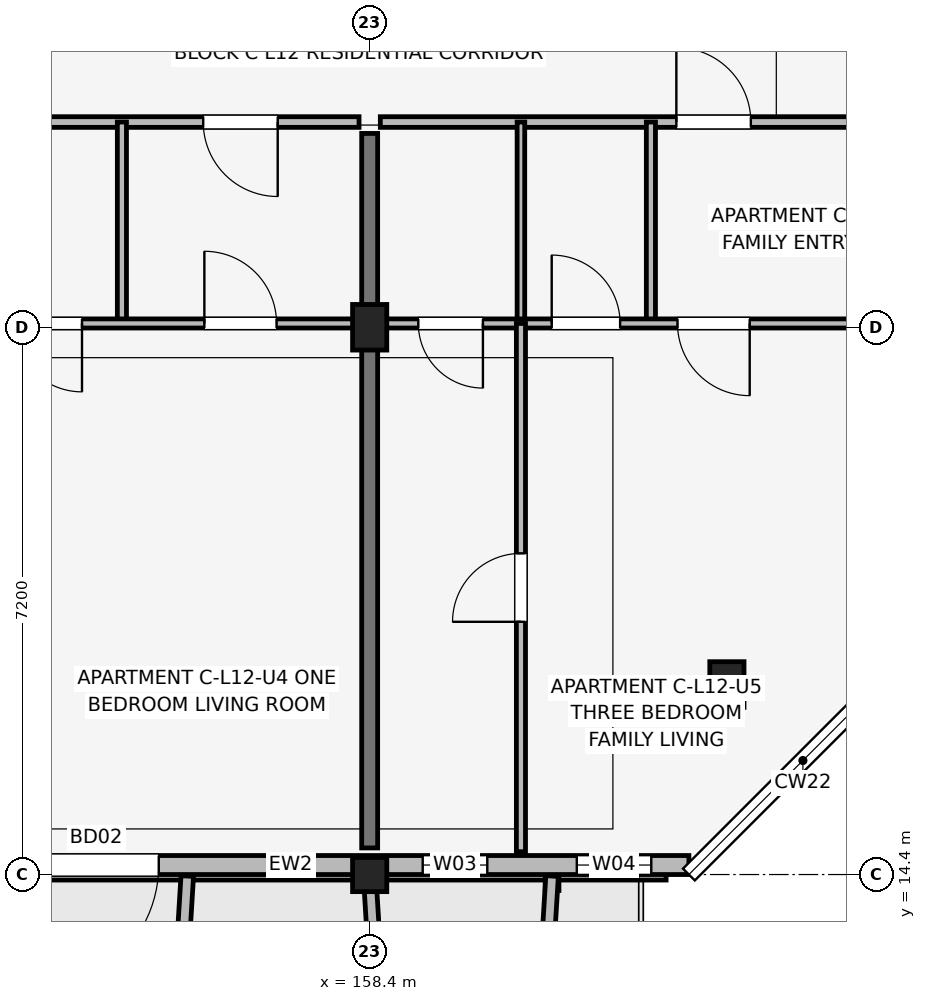
"""IFC4 building model, lengths in metres.
Left out: names, types, materials, properties, quantities, classifications, styles, units other than length and angle.
Written with IfcOpenShell. Run it as: python <this file> out.ifc"""

import sys

from ifc_helpers import new_model, si_unit, direction, frame, frame_2d, origin, origin_2d, place, context, subcontext, project, spatial, rectangle, extrude, element, fill, save


model = new_model("IFC4")
c1 = context("Model", 3, precision=1e-05, world=origin(), true_north=direction((0.0, 1.0)))
c2 = subcontext(c1, "Body", "Model", "MODEL_VIEW")
j1 = project(units=[si_unit("LENGTHUNIT", "METRE"), si_unit("PLANEANGLEUNIT", "RADIAN")], contexts=[c1])
p1 = place(None, origin())
s1 = spatial("IfcSite", under=j1, at=p1, CompositionType="ELEMENT")
p2 = place(p1, origin())
s2 = spatial("IfcBuilding", under=s1, at=p2, CompositionType="ELEMENT")
p3 = place(p2, frame((0.0, 0.0, 40.2)))
s3 = spatial("IfcBuildingStorey", under=s2, at=p3, CompositionType="ELEMENT", Elevation=40.2)
p4 = place(p3, frame((158.4, 14.4, 0.0), z_axis=(0.0, 0.0, 1.0), x_axis=(1.0, 0.0, 0.0)))
e1 = element("IfcColumn", 1, at=p4, inside=s3, PredefinedType="COLUMN", context=c2, shape_type="SweptSolid", body=[
    extrude(rectangle(XDim=0.45, YDim=0.45, at=origin_2d()), origin(), (0.0, 0.0, 1.0), 3.15),
])
for number, where, z_axis, x_axis in (
    (2, (158.4, 21.6, 0.0), (0.0, 0.0, 1.0), (1.0, 0.0, 0.0)),
    (3, (163.1, 16.9, 0.0), (0.0, 0.0, 1.0), (1.0, 0.0, 0.0)),
):
    element("IfcColumn", number, at=place(p3, frame(where, z_axis=z_axis, x_axis=x_axis)), inside=s3, PredefinedType="COLUMN", context=c2, shape_type="SweptSolid", body=[
        extrude(rectangle(XDim=0.45, YDim=0.6, at=origin_2d()), origin(), (0.0, 0.0, 1.0), 3.15),
    ])
p5 = place(p3, frame((158.4, 14.75, 0.0), z_axis=(0.0, 0.0, 1.0), x_axis=(0.0, 1.0, 0.0)))
e4 = element("IfcWall", 4, at=p5, inside=s3, PredefinedType="SHEAR", context=c2, shape_type="SweptSolid", body=[
    extrude(rectangle(XDim=9.4, YDim=0.21, at=frame_2d((4.7, 0.0))), origin(), (0.0, 0.0, 1.0), 3.15),
])
p6 = place(p3, frame((132.6, 14.525, 0.0), z_axis=(0.0, 0.0, 1.0), x_axis=(1.0, 0.0, 0.0)))
e5 = element("IfcWall", 5, at=p6, inside=s3, PredefinedType="SOLIDWALL", context=c2, shape_type="SweptSolid", body=[
    extrude(rectangle(XDim=30.0, YDim=0.25, at=frame_2d((15.0, 0.0))), origin(), (0.0, 0.0, 1.0), 2.48),
])
p7 = place(p6, frame((8.7, 0.0, 0.0), z_axis=(0.0, 0.0, 1.0), x_axis=(-1.0, 0.0, 0.0)))
e6 = element("IfcOpeningElement", 6, at=p7, cuts=e5, PredefinedType="OPENING", context=c2, shape_type="SweptSolid", body=[
    extrude(rectangle(XDim=1.8, YDim=2.15, at=frame_2d((0.9, 1.075))), frame((0.0, 0.135, 0.0), z_axis=(0.0, -1.0, 0.0), x_axis=(1.0, 0.0, 0.0)), (0.0, 0.0, 1.0), 0.27),
])
p8 = place(p6, frame((23.025, 0.0, 0.0), z_axis=(0.0, 0.0, 1.0), x_axis=(-1.0, 0.0, 0.0)))
e7 = element("IfcOpeningElement", 7, at=p8, cuts=e5, PredefinedType="OPENING", context=c2, shape_type="SweptSolid", body=[
    extrude(rectangle(XDim=1.65, YDim=2.15, at=frame_2d((0.825, 1.075))), frame((0.0, 0.135, 0.0), z_axis=(0.0, -1.0, 0.0), x_axis=(1.0, 0.0, 0.0)), (0.0, 0.0, 1.0), 0.27),
])
p9 = place(p6, frame((2.077, 0.0, 0.7)))
e8 = element("IfcOpeningElement", 8, at=p9, cuts=e5, PredefinedType="OPENING", context=c2, shape_type="SweptSolid", body=[
    extrude(rectangle(XDim=1.58, YDim=1.6, at=frame_2d((0.79, 0.8))), frame((0.0, 0.135, 0.0), z_axis=(0.0, -1.0, 0.0), x_axis=(1.0, 0.0, 0.0)), (0.0, 0.0, 1.0), 0.27),
])
p10 = place(p6, frame((11.873, 0.0, 0.7)))
e9 = element("IfcOpeningElement", 9, at=p10, cuts=e5, PredefinedType="OPENING", context=c2, shape_type="SweptSolid", body=[
    extrude(rectangle(XDim=1.72, YDim=1.6, at=frame_2d((0.86, 0.8))), frame((0.0, 0.135, 0.0), z_axis=(0.0, -1.0, 0.0), x_axis=(1.0, 0.0, 0.0)), (0.0, 0.0, 1.0), 0.27),
])
p11 = place(p6, frame((16.968, 0.0, 0.75)))
e10 = element("IfcOpeningElement", 10, at=p11, cuts=e5, PredefinedType="OPENING", context=c2, shape_type="SweptSolid", body=[
    extrude(rectangle(XDim=0.6, YDim=1.25, at=frame_2d((0.3, 0.625))), frame((0.0, 0.135, 0.0), z_axis=(0.0, -1.0, 0.0), x_axis=(1.0, 0.0, 0.0)), (0.0, 0.0, 1.0), 0.27),
])
p12 = place(p6, frame((19.363, 0.0, 0.75)))
e11 = element("IfcOpeningElement", 11, at=p12, cuts=e5, PredefinedType="OPENING", context=c2, shape_type="SweptSolid", body=[
    extrude(rectangle(XDim=0.72, YDim=1.35, at=frame_2d((0.36, 0.675))), frame((0.0, 0.135, 0.0), z_axis=(0.0, -1.0, 0.0), x_axis=(1.0, 0.0, 0.0)), (0.0, 0.0, 1.0), 0.27),
])
p13 = place(p6, frame((26.498, 0.0, 0.75)))
e12 = element("IfcOpeningElement", 12, at=p13, cuts=e5, PredefinedType="OPENING", context=c2, shape_type="SweptSolid", body=[
    extrude(rectangle(XDim=0.85, YDim=1.4, at=frame_2d((0.425, 0.7))), frame((0.0, 0.135, 0.0), z_axis=(0.0, -1.0, 0.0), x_axis=(1.0, 0.0, 0.0)), (0.0, 0.0, 1.0), 0.27),
])
p14 = place(p6, frame((28.525, 0.0, 0.75)))
e13 = element("IfcOpeningElement", 13, at=p14, cuts=e5, PredefinedType="OPENING", context=c2, shape_type="SweptSolid", body=[
    extrude(rectangle(XDim=0.98, YDim=1.45, at=frame_2d((0.49, 0.725))), frame((0.0, 0.135, 0.0), z_axis=(0.0, -1.0, 0.0), x_axis=(1.0, 0.0, 0.0)), (0.0, 0.0, 1.0), 0.27),
])
for number, where, z_axis, x_axis in (
    (14, (156.0, 14.38, 0.0), (0.0, 0.0, 1.0), (-0.061, -0.998, 0.0)),
    (15, (158.4, 14.38, 0.0), (0.0, 0.0, 1.0), (0.061, -0.998, 0.0)),
):
    element("IfcWall", number, at=place(p3, frame(where, z_axis=z_axis, x_axis=x_axis)), inside=s3, PredefinedType="ELEMENTEDWALL", context=c2, shape_type="SweptSolid", body=[
        extrude(rectangle(XDim=1.964, YDim=0.165, at=frame_2d((0.982, 0.0))), origin(), (0.0, 0.0, 1.0), 2.48),
    ])
p15 = place(p3, frame((160.8, 14.38, 0.0), z_axis=(0.0, 0.0, 1.0), x_axis=(-0.061170732449, -0.998127317276, 0.0)))
e16 = element("IfcWall", 16, at=p15, inside=s3, PredefinedType="ELEMENTEDWALL", context=c2, shape_type="SweptSolid", body=[
    extrude(rectangle(XDim=1.964, YDim=0.165, at=frame_2d((0.982, 0.0))), origin(), (0.0, 0.0, 1.0), 2.8),
])
p16 = place(p3, frame((151.34, 24.3, 0.0), z_axis=(0.0, 0.0, 1.0), x_axis=(1.0, 0.0, 0.0)))
e17 = element("IfcWall", 17, at=p16, inside=s3, PredefinedType="PARTITIONING", context=c2, shape_type="SweptSolid", body=[
    extrude(rectangle(XDim=6.92, YDim=0.14, at=frame_2d((3.46, 0.0))), origin(), (0.0, 0.0, 1.0), 2.38),
])
p17 = place(p16, frame((5.85, 0.0, 0.0), z_axis=(0.0, 0.0, 1.0), x_axis=(-1.0, 0.0, 0.0)))
e18 = element("IfcOpeningElement", 18, at=p17, cuts=e17, PredefinedType="OPENING", context=c2, shape_type="SweptSolid", body=[
    extrude(rectangle(XDim=0.98, YDim=2.1, at=frame_2d((0.49, 1.05))), frame((0.0, 0.08, 0.0), z_axis=(0.0, -1.0, 0.0), x_axis=(1.0, 0.0, 0.0)), (0.0, 0.0, 1.0), 0.16),
])
p18 = place(p3, frame((155.14, 21.65, 0.0), z_axis=(0.0, 0.0, 1.0), x_axis=(0.0, 1.0, 0.0)))
e19 = element("IfcWall", 19, at=p18, inside=s3, PredefinedType="PARTITIONING", context=c2, shape_type="SweptSolid", body=[
    extrude(rectangle(XDim=2.65, YDim=0.12, at=frame_2d((1.325, 0.0))), origin(), (0.0, 0.0, 1.0), 2.38),
])
p19 = place(p3, frame((151.34, 21.65, 0.0), z_axis=(0.0, 0.0, 1.0), x_axis=(1.0, 0.0, 0.0)))
e20 = element("IfcWall", 20, at=p19, inside=s3, PredefinedType="PARTITIONING", context=c2, shape_type="SweptSolid", body=[
    extrude(rectangle(XDim=6.92, YDim=0.12, at=frame_2d((3.46, 0.0))), origin(), (0.0, 0.0, 1.0), 2.38),
])
p20 = place(p19, frame((0.5, 0.0, 0.0)))
e21 = element("IfcOpeningElement", 21, at=p20, cuts=e20, PredefinedType="OPENING", context=c2, shape_type="SweptSolid", body=[
    extrude(rectangle(XDim=0.85, YDim=2.08, at=frame_2d((0.425, 1.04))), frame((0.0, 0.07, 0.0), z_axis=(0.0, -1.0, 0.0), x_axis=(1.0, 0.0, 0.0)), (0.0, 0.0, 1.0), 0.14),
])
p21 = place(p19, frame((3.275, 0.0, 0.0), z_axis=(0.0, 0.0, 1.0), x_axis=(-1.0, 0.0, 0.0)))
e22 = element("IfcOpeningElement", 22, at=p21, cuts=e20, PredefinedType="OPENING", context=c2, shape_type="SweptSolid", body=[
    extrude(rectangle(XDim=0.9, YDim=2.08, at=frame_2d((0.45, 1.04))), frame((0.0, 0.07, 0.0), z_axis=(0.0, -1.0, 0.0), x_axis=(1.0, 0.0, 0.0)), (0.0, 0.0, 1.0), 0.14),
])
p22 = place(p19, frame((4.885, 0.0, 0.0)))
e23 = element("IfcOpeningElement", 23, at=p22, cuts=e20, PredefinedType="OPENING", context=c2, shape_type="SweptSolid", body=[
    extrude(rectangle(XDim=0.95, YDim=2.08, at=frame_2d((0.475, 1.04))), frame((0.0, 0.07, 0.0), z_axis=(0.0, -1.0, 0.0), x_axis=(1.0, 0.0, 0.0)), (0.0, 0.0, 1.0), 0.14),
])
p23 = place(p3, frame((158.54, 24.3, 0.0), z_axis=(0.0, 0.0, 1.0), x_axis=(1.0, 0.0, 0.0)))
e24 = element("IfcWall", 24, at=p23, inside=s3, PredefinedType="PARTITIONING", context=c2, shape_type="SweptSolid", body=[
    extrude(rectangle(XDim=6.92, YDim=0.14, at=frame_2d((3.46, 0.0))), origin(), (0.0, 0.0, 1.0), 2.38),
])
p24 = place(p23, frame((3.895, 0.0, 0.0)))
e25 = element("IfcOpeningElement", 25, at=p24, cuts=e24, PredefinedType="OPENING", context=c2, shape_type="SweptSolid", body=[
    extrude(rectangle(XDim=0.98, YDim=2.1, at=frame_2d((0.49, 1.05))), frame((0.0, 0.08, 0.0), z_axis=(0.0, -1.0, 0.0), x_axis=(1.0, 0.0, 0.0)), (0.0, 0.0, 1.0), 0.16),
])
p25 = place(p3, frame((160.39, 21.65, 0.0), z_axis=(0.0, 0.0, 1.0), x_axis=(0.0, 1.0, 0.0)))
e26 = element("IfcWall", 26, at=p25, inside=s3, PredefinedType="PARTITIONING", context=c2, shape_type="SweptSolid", body=[
    extrude(rectangle(XDim=2.65, YDim=0.1, at=frame_2d((1.325, 0.0))), origin(), (0.0, 0.0, 1.0), 2.38),
])
p26 = place(p3, frame((162.1, 21.65, 0.0), z_axis=(0.0, 0.0, 1.0), x_axis=(0.0, 1.0, 0.0)))
e27 = element("IfcWall", 27, at=p26, inside=s3, PredefinedType="PARTITIONING", context=c2, shape_type="SweptSolid", body=[
    extrude(rectangle(XDim=2.65, YDim=0.12, at=frame_2d((1.325, 0.0))), origin(), (0.0, 0.0, 1.0), 2.38),
])
p27 = place(p3, frame((158.54, 21.65, 0.0), z_axis=(0.0, 0.0, 1.0), x_axis=(1.0, 0.0, 0.0)))
e28 = element("IfcWall", 28, at=p27, inside=s3, PredefinedType="PARTITIONING", context=c2, shape_type="SweptSolid", body=[
    extrude(rectangle(XDim=6.92, YDim=0.12, at=frame_2d((3.46, 0.0))), origin(), (0.0, 0.0, 1.0), 2.38),
])
p28 = place(p27, frame((1.35, 0.0, 0.0), z_axis=(0.0, 0.0, 1.0), x_axis=(-1.0, 0.0, 0.0)))
e29 = element("IfcOpeningElement", 29, at=p28, cuts=e28, PredefinedType="OPENING", context=c2, shape_type="SweptSolid", body=[
    extrude(rectangle(XDim=0.85, YDim=2.08, at=frame_2d((0.425, 1.04))), frame((0.0, 0.07, 0.0), z_axis=(0.0, -1.0, 0.0), x_axis=(1.0, 0.0, 0.0)), (0.0, 0.0, 1.0), 0.14),
])
p29 = place(p27, frame((2.255, 0.0, 0.0)))
e30 = element("IfcOpeningElement", 30, at=p29, cuts=e28, PredefinedType="OPENING", context=c2, shape_type="SweptSolid", body=[
    extrude(rectangle(XDim=0.9, YDim=2.08, at=frame_2d((0.45, 1.04))), frame((0.0, 0.07, 0.0), z_axis=(0.0, -1.0, 0.0), x_axis=(1.0, 0.0, 0.0)), (0.0, 0.0, 1.0), 0.14),
])
p30 = place(p27, frame((4.86, 0.0, 0.0), z_axis=(0.0, 0.0, 1.0), x_axis=(-1.0, 0.0, 0.0)))
e31 = element("IfcOpeningElement", 31, at=p30, cuts=e28, PredefinedType="OPENING", context=c2, shape_type="SweptSolid", body=[
    extrude(rectangle(XDim=0.95, YDim=2.08, at=frame_2d((0.475, 1.04))), frame((0.0, 0.07, 0.0), z_axis=(0.0, -1.0, 0.0), x_axis=(1.0, 0.0, 0.0)), (0.0, 0.0, 1.0), 0.14),
])
p31 = place(p3, frame((160.39, 14.7, 0.0), z_axis=(0.0, 0.0, 1.0), x_axis=(0.0, 1.0, 0.0)))
e32 = element("IfcWall", 32, at=p31, inside=s3, PredefinedType="PARTITIONING", context=c2, shape_type="SweptSolid", body=[
    extrude(rectangle(XDim=6.95, YDim=0.12, at=frame_2d((3.475, 0.0))), origin(), (0.0, 0.0, 1.0), 2.38),
])
p32 = place(p31, frame((3.025, 0.0, 0.0)))
e33 = element("IfcOpeningElement", 33, at=p32, cuts=e32, PredefinedType="OPENING", context=c2, shape_type="SweptSolid", body=[
    extrude(rectangle(XDim=0.9, YDim=2.08, at=frame_2d((0.45, 1.04))), frame((0.0, 0.07, 0.0), z_axis=(0.0, -1.0, 0.0), x_axis=(1.0, 0.0, 0.0)), (0.0, 0.0, 1.0), 0.14),
])
p33 = place(p8, origin())
e34 = element("IfcDoor", 34, at=p33, inside=s3, OperationType="SINGLE_SWING_LEFT", PredefinedType="DOOR", context=c2, shape_type="SweptSolid", body=[
    extrude(rectangle(XDim=1.65, YDim=2.15, at=frame_2d((0.825, 1.075))), frame((0.0, 0.025, 0.0), z_axis=(0.0, -1.0, 0.0), x_axis=(1.0, 0.0, 0.0)), (0.0, 0.0, 1.0), 0.05),
])
fill(e7, e34)
p34 = place(p13, origin())
e35 = element("IfcWindow", 35, at=p34, inside=s3, PartitioningType="SINGLE_PANEL", PredefinedType="WINDOW", context=c2, shape_type="SweptSolid", body=[
    extrude(rectangle(XDim=0.85, YDim=1.4, at=frame_2d((0.425, 0.7))), frame((0.0, 0.03, 0.0), z_axis=(0.0, -1.0, 0.0), x_axis=(1.0, 0.0, 0.0)), (0.0, 0.0, 1.0), 0.06),
])
fill(e12, e35)
p35 = place(p14, origin())
e36 = element("IfcWindow", 36, at=p35, inside=s3, PartitioningType="SINGLE_PANEL", PredefinedType="WINDOW", context=c2, shape_type="SweptSolid", body=[
    extrude(rectangle(XDim=0.98, YDim=1.45, at=frame_2d((0.49, 0.725))), frame((0.0, 0.03, 0.0), z_axis=(0.0, -1.0, 0.0), x_axis=(1.0, 0.0, 0.0)), (0.0, 0.0, 1.0), 0.06),
])
fill(e13, e36)
p36 = place(p17, origin())
e37 = element("IfcDoor", 37, at=p36, inside=s3, OperationType="SINGLE_SWING_RIGHT", PredefinedType="DOOR", context=c2, shape_type="SweptSolid", body=[
    extrude(rectangle(XDim=0.98, YDim=2.1, at=frame_2d((0.49, 1.05))), frame((0.0, 0.025, 0.0), z_axis=(0.0, -1.0, 0.0), x_axis=(1.0, 0.0, 0.0)), (0.0, 0.0, 1.0), 0.05),
])
fill(e18, e37)
p37 = place(p21, origin())
e38 = element("IfcDoor", 38, at=p37, inside=s3, OperationType="SINGLE_SWING_RIGHT", PredefinedType="DOOR", context=c2, shape_type="SweptSolid", body=[
    extrude(rectangle(XDim=0.9, YDim=2.08, at=frame_2d((0.45, 1.04))), frame((0.0, 0.025, 0.0), z_axis=(0.0, -1.0, 0.0), x_axis=(1.0, 0.0, 0.0)), (0.0, 0.0, 1.0), 0.05),
])
fill(e22, e38)
p38 = place(p22, origin())
e39 = element("IfcDoor", 39, at=p38, inside=s3, OperationType="SINGLE_SWING_LEFT", PredefinedType="DOOR", context=c2, shape_type="SweptSolid", body=[
    extrude(rectangle(XDim=0.95, YDim=2.08, at=frame_2d((0.475, 1.04))), frame((0.0, 0.025, 0.0), z_axis=(0.0, -1.0, 0.0), x_axis=(1.0, 0.0, 0.0)), (0.0, 0.0, 1.0), 0.05),
])
fill(e23, e39)
p39 = place(p24, origin())
e40 = element("IfcDoor", 40, at=p39, inside=s3, OperationType="SINGLE_SWING_LEFT", PredefinedType="DOOR", context=c2, shape_type="SweptSolid", body=[
    extrude(rectangle(XDim=0.98, YDim=2.1, at=frame_2d((0.49, 1.05))), frame((0.0, 0.025, 0.0), z_axis=(0.0, -1.0, 0.0), x_axis=(1.0, 0.0, 0.0)), (0.0, 0.0, 1.0), 0.05),
])
fill(e25, e40)
p40 = place(p28, origin())
e41 = element("IfcDoor", 41, at=p40, inside=s3, OperationType="SINGLE_SWING_RIGHT", PredefinedType="DOOR", context=c2, shape_type="SweptSolid", body=[
    extrude(rectangle(XDim=0.85, YDim=2.08, at=frame_2d((0.425, 1.04))), frame((0.0, 0.025, 0.0), z_axis=(0.0, -1.0, 0.0), x_axis=(1.0, 0.0, 0.0)), (0.0, 0.0, 1.0), 0.05),
])
fill(e29, e41)
p41 = place(p29, origin())
e42 = element("IfcDoor", 42, at=p41, inside=s3, OperationType="SINGLE_SWING_LEFT", PredefinedType="DOOR", context=c2, shape_type="SweptSolid", body=[
    extrude(rectangle(XDim=0.9, YDim=2.08, at=frame_2d((0.45, 1.04))), frame((0.0, 0.025, 0.0), z_axis=(0.0, -1.0, 0.0), x_axis=(1.0, 0.0, 0.0)), (0.0, 0.0, 1.0), 0.05),
])
fill(e30, e42)
p42 = place(p30, origin())
e43 = element("IfcDoor", 43, at=p42, inside=s3, OperationType="SINGLE_SWING_RIGHT", PredefinedType="DOOR", context=c2, shape_type="SweptSolid", body=[
    extrude(rectangle(XDim=0.95, YDim=2.08, at=frame_2d((0.475, 1.04))), frame((0.0, 0.025, 0.0), z_axis=(0.0, -1.0, 0.0), x_axis=(1.0, 0.0, 0.0)), (0.0, 0.0, 1.0), 0.05),
])
fill(e31, e43)
p43 = place(p32, origin())
e44 = element("IfcDoor", 44, at=p43, inside=s3, OperationType="SINGLE_SWING_LEFT", PredefinedType="DOOR", context=c2, shape_type="SweptSolid", body=[
    extrude(rectangle(XDim=0.9, YDim=2.08, at=frame_2d((0.45, 1.04))), frame((0.0, 0.025, 0.0), z_axis=(0.0, -1.0, 0.0), x_axis=(1.0, 0.0, 0.0)), (0.0, 0.0, 1.0), 0.05),
])
fill(e33, e44)
save(model, sys.argv[1])
